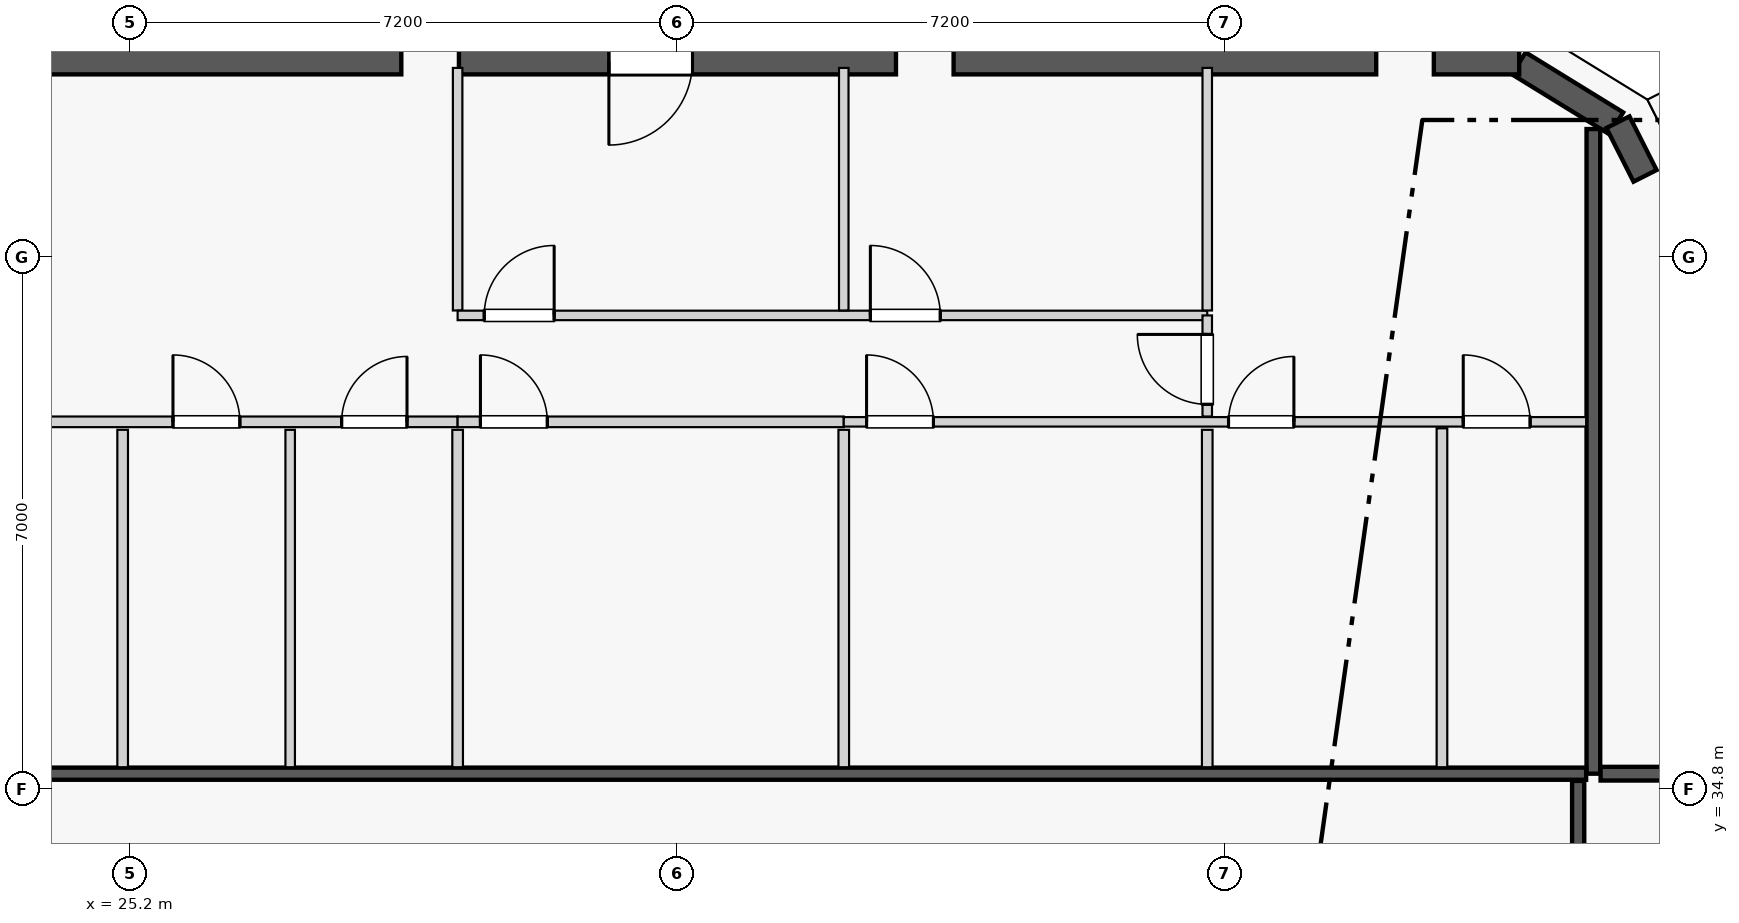
"""IFC4 building model, lengths in metres.
Left out: names, types, materials, properties, quantities, classifications, styles, units other than length and angle.
Written with IfcOpenShell. Run it as: python <this file> out.ifc"""

import sys

from ifc_helpers import new_model, si_unit, direction, frame, frame_2d, origin, origin_2d, place, context, subcontext, project, spatial, rectangle, extrude, element, fill, save


model = new_model("IFC4")
c1 = context("Model", 3, precision=1e-05, world=origin(), true_north=direction((0.0, 1.0)))
c2 = subcontext(c1, "Body", "Model", "MODEL_VIEW")
j1 = project(units=[si_unit("LENGTHUNIT", "METRE"), si_unit("PLANEANGLEUNIT", "RADIAN")], contexts=[c1])
p1 = place(None, origin())
s1 = spatial("IfcSite", under=j1, at=p1, CompositionType="ELEMENT")
p2 = place(p1, origin())
s2 = spatial("IfcBuilding", under=s1, at=p2, CompositionType="ELEMENT")
p3 = place(p2, frame((0.0, 0.0, 241.6)))
s3 = spatial("IfcBuildingStorey", under=s2, at=p3, CompositionType="ELEMENT", Elevation=241.6)
for number, where, z_axis, x_axis in (
    (1, (45.341, 42.409, 0.0), (0.0, 0.0, 1.0), (1.0, 0.0, 0.0)),
    (2, (41.972, 44.361, 0.0), (0.0, 0.0, 1.0), (1.0, 0.0, 0.0)),
    (3, (35.654, 44.308, 0.0), (0.0, 0.0, 1.0), (1.0, 0.0, 0.0)),
    (4, (29.146, 44.308, 0.0), (0.0, 0.0, 1.0), (1.0, 0.0, 0.0)),
):
    element("IfcColumn", number, at=place(p3, frame(where, z_axis=z_axis, x_axis=x_axis)), inside=s3, PredefinedType="COLUMN", context=c2, shape_type="SweptSolid", body=[
        extrude(rectangle(XDim=0.75, YDim=0.75, at=origin_2d()), origin(), (0.0, 0.0, 1.0), 3.65),
    ])
p4 = place(p3, frame((43.657, 43.385, 0.0), z_axis=(0.0, 0.0, 1.0), x_axis=(-0.865256437757, 0.501329529272, 0.0)))
e5 = element("IfcColumn", 5, at=p4, inside=s3, PredefinedType="PILASTER", context=c2, shape_type="SweptSolid", body=[
    extrude(rectangle(XDim=0.5, YDim=0.35, at=origin_2d()), origin(), (0.0, 0.0, 1.0), 3.65),
])
p5 = place(p3, frame((44.753, 43.555, 0.0), z_axis=(0.0, 0.0, 1.0), x_axis=(-0.851680557619, 0.52406128246, 0.0)))
e6 = element("IfcWall", 6, at=p5, inside=s3, PredefinedType="STANDARD", context=c2, shape_type="SweptSolid", body=[
    extrude(rectangle(XDim=1.508, YDim=0.34, at=frame_2d((0.754, 0.0))), origin(), (0.0, 0.0, 1.0), 3.45),
])
p6 = place(p3, frame((45.13, 42.865, 0.0), z_axis=(0.0, 0.0, 1.0), x_axis=(-0.451159191899, 0.892443490404, 0.0)))
e7 = element("IfcWall", 7, at=p6, inside=s3, PredefinedType="STANDARD", context=c2, shape_type="SweptSolid", body=[
    extrude(rectangle(XDim=0.791, YDim=0.34, at=frame_2d((0.396, 0.0))), origin(), (0.0, 0.0, 1.0), 3.45),
])
p7 = place(p3, frame((43.474, 44.37, 0.0), z_axis=(0.0, 0.0, 1.0), x_axis=(-1.0, 0.0, 0.0)))
e8 = element("IfcWall", 8, at=p7, inside=s3, PredefinedType="STANDARD", context=c2, shape_type="SweptSolid", body=[
    extrude(rectangle(XDim=1.123, YDim=0.34, at=frame_2d((0.562, 0.0))), origin(), (0.0, 0.0, 1.0), 3.45),
])
p8 = place(p3, frame((41.593, 44.37, 0.0), z_axis=(0.0, 0.0, 1.0), x_axis=(-1.0, 0.0, 0.0)))
e9 = element("IfcWall", 9, at=p8, inside=s3, PredefinedType="STANDARD", context=c2, shape_type="SweptSolid", body=[
    extrude(rectangle(XDim=5.56, YDim=0.34, at=frame_2d((2.78, 0.0))), origin(), (0.0, 0.0, 1.0), 2.983),
])
p9 = place(p8, frame((0.28, 0.0, 0.75)))
e10 = element("IfcOpeningElement", 10, at=p9, cuts=e9, PredefinedType="OPENING", context=c2, shape_type="SweptSolid", body=[
    extrude(rectangle(XDim=1.55, YDim=2.05, at=frame_2d((0.775, 1.025))), frame((0.0, 0.18, 0.0), z_axis=(0.0, -1.0, 0.0), x_axis=(1.0, 0.0, 0.0)), (0.0, 0.0, 1.0), 0.36),
])
p10 = place(p8, frame((3.398, 0.0, 0.75)))
e11 = element("IfcOpeningElement", 11, at=p10, cuts=e9, PredefinedType="OPENING", context=c2, shape_type="SweptSolid", body=[
    extrude(rectangle(XDim=1.1, YDim=2.0, at=frame_2d((0.55, 1.0))), frame((0.0, 0.18, 0.0), z_axis=(0.0, -1.0, 0.0), x_axis=(1.0, 0.0, 0.0)), (0.0, 0.0, 1.0), 0.36),
])
p11 = place(p3, frame((35.275, 44.37, 0.0), z_axis=(0.0, 0.0, 1.0), x_axis=(-1.0, 0.0, 0.0)))
e12 = element("IfcWall", 12, at=p11, inside=s3, PredefinedType="STANDARD", context=c2, shape_type="SweptSolid", body=[
    extrude(rectangle(XDim=5.75, YDim=0.34, at=frame_2d((2.875, 0.0))), origin(), (0.0, 0.0, 1.0), 2.983),
])
p12 = place(p11, frame((2.677, 0.0, 0.0)))
e13 = element("IfcOpeningElement", 13, at=p12, cuts=e12, PredefinedType="OPENING", context=c2, shape_type="SweptSolid", body=[
    extrude(rectangle(XDim=1.1, YDim=2.25, at=frame_2d((0.55, 1.125))), frame((0.0, 0.18, 0.0), z_axis=(0.0, -1.0, 0.0), x_axis=(1.0, 0.0, 0.0)), (0.0, 0.0, 1.0), 0.36),
])
p13 = place(p3, frame((28.767, 44.37, 0.0), z_axis=(0.0, 0.0, 1.0), x_axis=(-1.0, 0.0, 0.0)))
e14 = element("IfcWall", 14, at=p13, inside=s3, PredefinedType="STANDARD", context=c2, shape_type="SweptSolid", body=[
    extrude(rectangle(XDim=5.56, YDim=0.34, at=frame_2d((2.78, 0.0))), origin(), (0.0, 0.0, 1.0), 2.983),
])
p14 = place(p13, frame((2.155, 0.0, 0.75)))
e15 = element("IfcOpeningElement", 15, at=p14, cuts=e14, PredefinedType="OPENING", context=c2, shape_type="SweptSolid", body=[
    extrude(rectangle(XDim=1.25, YDim=1.95, at=frame_2d((0.625, 0.975))), frame((0.0, 0.18, 0.0), z_axis=(0.0, -1.0, 0.0), x_axis=(1.0, 0.0, 0.0)), (0.0, 0.0, 1.0), 0.36),
])
p15 = place(p3, frame((44.45, 35.0, 0.0), z_axis=(0.0, 0.0, 1.0), x_axis=(0.0, 1.0, 0.0)))
e16 = element("IfcWall", 16, at=p15, inside=s3, PredefinedType="PARTITIONING", context=c2, shape_type="SweptSolid", body=[
    extrude(rectangle(XDim=8.481, YDim=0.18, at=frame_2d((4.24, 0.0))), origin(), (0.0, 0.0, 1.0), 3.45),
])
p16 = place(p3, frame((20.445, 35.0, 0.0), z_axis=(0.0, 0.0, 1.0), x_axis=(1.0, 0.0, 0.0)))
e17 = element("IfcWall", 17, at=p16, inside=s3, PredefinedType="PARTITIONING", context=c2, shape_type="SweptSolid", body=[
    extrude(rectangle(XDim=23.91, YDim=0.16, at=frame_2d((11.955, 0.0))), origin(), (0.0, 0.0, 1.0), 3.45),
])
p17 = place(p16, frame((0.405, 0.0, 0.0)))
e18 = element("IfcOpeningElement", 18, at=p17, cuts=e17, PredefinedType="OPENING", context=c2, shape_type="SweptSolid", body=[
    extrude(rectangle(XDim=1.35, YDim=2.35, at=frame_2d((0.675, 1.175))), frame((0.0, 0.09, 0.0), z_axis=(0.0, -1.0, 0.0), x_axis=(1.0, 0.0, 0.0)), (0.0, 0.0, 1.0), 0.18),
])
p18 = place(p3, frame((22.4, 39.629, 0.0), z_axis=(0.0, 0.0, 1.0), x_axis=(1.0, 0.0, 0.0)))
e19 = element("IfcWall", 19, at=p18, inside=s3, PredefinedType="PLUMBINGWALL", context=c2, shape_type="SweptSolid", body=[
    extrude(rectangle(XDim=7.108, YDim=0.14, at=frame_2d((3.554, 0.0))), origin(), (0.0, 0.0, 1.0), 3.45),
])
p19 = place(p18, frame((5.582, 0.0, 0.0)))
e20 = element("IfcOpeningElement", 20, at=p19, cuts=e19, PredefinedType="OPENING", context=c2, shape_type="SweptSolid", body=[
    extrude(rectangle(XDim=0.86, YDim=2.1, at=frame_2d((0.43, 1.05))), frame((0.0, 0.08, 0.0), z_axis=(0.0, -1.0, 0.0), x_axis=(1.0, 0.0, 0.0)), (0.0, 0.0, 1.0), 0.16),
])
p20 = place(p18, frame((0.26, 0.0, 0.0)))
e21 = element("IfcOpeningElement", 21, at=p20, cuts=e19, PredefinedType="OPENING", context=c2, shape_type="SweptSolid", body=[
    extrude(rectangle(XDim=0.88, YDim=2.15, at=frame_2d((0.44, 1.075))), frame((0.0, 0.08, 0.0), z_axis=(0.0, -1.0, 0.0), x_axis=(1.0, 0.0, 0.0)), (0.0, 0.0, 1.0), 0.16),
])
p21 = place(p18, frame((3.363, 0.0, 0.0)))
e22 = element("IfcOpeningElement", 22, at=p21, cuts=e19, PredefinedType="OPENING", context=c2, shape_type="SweptSolid", body=[
    extrude(rectangle(XDim=0.88, YDim=2.15, at=frame_2d((0.44, 1.075))), frame((0.0, 0.08, 0.0), z_axis=(0.0, -1.0, 0.0), x_axis=(1.0, 0.0, 0.0)), (0.0, 0.0, 1.0), 0.16),
])
p22 = place(p3, frame((29.508, 39.629, 0.0), z_axis=(0.0, 0.0, 1.0), x_axis=(1.0, 0.0, 0.0)))
e23 = element("IfcWall", 23, at=p22, inside=s3, PredefinedType="PLUMBINGWALL", context=c2, shape_type="SweptSolid", body=[
    extrude(rectangle(XDim=5.08, YDim=0.14, at=frame_2d((2.54, 0.0))), origin(), (0.0, 0.0, 1.0), 3.45),
])
p23 = place(p22, frame((0.3, 0.0, 0.0)))
e24 = element("IfcOpeningElement", 24, at=p23, cuts=e23, PredefinedType="OPENING", context=c2, shape_type="SweptSolid", body=[
    extrude(rectangle(XDim=0.88, YDim=2.15, at=frame_2d((0.44, 1.075))), frame((0.0, 0.08, 0.0), z_axis=(0.0, -1.0, 0.0), x_axis=(1.0, 0.0, 0.0)), (0.0, 0.0, 1.0), 0.16),
])
p24 = place(p3, frame((34.588, 39.629, 0.0), z_axis=(0.0, 0.0, 1.0), x_axis=(1.0, 0.0, 0.0)))
e25 = element("IfcWall", 25, at=p24, inside=s3, PredefinedType="PARTITIONING", context=c2, shape_type="SweptSolid", body=[
    extrude(rectangle(XDim=9.767, YDim=0.125, at=frame_2d((4.884, 0.0))), origin(), (0.0, 0.0, 1.0), 3.45),
])
p25 = place(p24, frame((5.062, 0.0, 0.0)))
e26 = element("IfcOpeningElement", 26, at=p25, cuts=e25, PredefinedType="OPENING", context=c2, shape_type="SweptSolid", body=[
    extrude(rectangle(XDim=0.86, YDim=2.1, at=frame_2d((0.43, 1.05))), frame((0.0, 0.073, 0.0), z_axis=(0.0, -1.0, 0.0), x_axis=(1.0, 0.0, 0.0)), (0.0, 0.0, 1.0), 0.145),
])
p26 = place(p24, frame((8.15, 0.0, 0.0)))
e27 = element("IfcOpeningElement", 27, at=p26, cuts=e25, PredefinedType="OPENING", context=c2, shape_type="SweptSolid", body=[
    extrude(rectangle(XDim=0.88, YDim=2.15, at=frame_2d((0.44, 1.075))), frame((0.0, 0.073, 0.0), z_axis=(0.0, -1.0, 0.0), x_axis=(1.0, 0.0, 0.0)), (0.0, 0.0, 1.0), 0.145),
])
p27 = place(p24, frame((0.3, 0.0, 0.0)))
e28 = element("IfcOpeningElement", 28, at=p27, cuts=e25, PredefinedType="OPENING", context=c2, shape_type="SweptSolid", body=[
    extrude(rectangle(XDim=0.88, YDim=2.15, at=frame_2d((0.44, 1.075))), frame((0.0, 0.073, 0.0), z_axis=(0.0, -1.0, 0.0), x_axis=(1.0, 0.0, 0.0)), (0.0, 0.0, 1.0), 0.145),
])
p28 = place(p3, frame((25.101, 35.085, 0.0), z_axis=(0.0, 0.0, 1.0), x_axis=(0.0, 1.0, 0.0)))
e29 = element("IfcWall", 29, at=p28, inside=s3, PredefinedType="PLUMBINGWALL", context=c2, shape_type="SweptSolid", body=[
    extrude(rectangle(XDim=4.439, YDim=0.14, at=frame_2d((2.219, 0.0))), origin(), (0.0, 0.0, 1.0), 3.45),
])
p29 = place(p3, frame((27.305, 35.085, 0.0), z_axis=(0.0, 0.0, 1.0), x_axis=(0.0, 1.0, 0.0)))
e30 = element("IfcWall", 30, at=p29, inside=s3, PredefinedType="PARTITIONING", context=c2, shape_type="SweptSolid", body=[
    extrude(rectangle(XDim=4.439, YDim=0.125, at=frame_2d((2.219, 0.0))), origin(), (0.0, 0.0, 1.0), 3.45),
])
p30 = place(p3, frame((29.508, 41.094, 0.0), z_axis=(0.0, 0.0, 1.0), x_axis=(0.0, 1.0, 0.0)))
e31 = element("IfcWall", 31, at=p30, inside=s3, PredefinedType="PARTITIONING", context=c2, shape_type="SweptSolid", body=[
    extrude(rectangle(XDim=3.191, YDim=0.125, at=frame_2d((1.595, 0.0))), origin(), (0.0, 0.0, 1.0), 3.45),
])
p31 = place(p3, frame((29.508, 41.029, 0.0), z_axis=(0.0, 0.0, 1.0), x_axis=(1.0, 0.0, 0.0)))
e32 = element("IfcWall", 32, at=p31, inside=s3, PredefinedType="PARTITIONING", context=c2, shape_type="SweptSolid", body=[
    extrude(rectangle(XDim=9.862, YDim=0.125, at=frame_2d((4.931, 0.0))), origin(), (0.0, 0.0, 1.0), 3.45),
])
p32 = place(p31, frame((0.35, 0.0, 0.0)))
e33 = element("IfcOpeningElement", 33, at=p32, cuts=e32, PredefinedType="OPENING", context=c2, shape_type="SweptSolid", body=[
    extrude(rectangle(XDim=0.92, YDim=2.15, at=frame_2d((0.46, 1.075))), frame((0.0, 0.073, 0.0), z_axis=(0.0, -1.0, 0.0), x_axis=(1.0, 0.0, 0.0)), (0.0, 0.0, 1.0), 0.145),
])
p33 = place(p31, frame((5.43, 0.0, 0.0)))
e34 = element("IfcOpeningElement", 34, at=p33, cuts=e32, PredefinedType="OPENING", context=c2, shape_type="SweptSolid", body=[
    extrude(rectangle(XDim=0.92, YDim=2.15, at=frame_2d((0.46, 1.075))), frame((0.0, 0.073, 0.0), z_axis=(0.0, -1.0, 0.0), x_axis=(1.0, 0.0, 0.0)), (0.0, 0.0, 1.0), 0.145),
])
p34 = place(p3, frame((39.37, 39.699, 0.0), z_axis=(0.0, 0.0, 1.0), x_axis=(0.0, 1.0, 0.0)))
e35 = element("IfcWall", 35, at=p34, inside=s3, PredefinedType="PARTITIONING", context=c2, shape_type="SweptSolid", body=[
    extrude(rectangle(XDim=1.33, YDim=0.125, at=frame_2d((0.665, 0.0))), origin(), (0.0, 0.0, 1.0), 3.45),
])
p35 = place(p34, frame((0.16, 0.0, 0.0)))
e36 = element("IfcOpeningElement", 36, at=p35, cuts=e35, PredefinedType="OPENING", context=c2, shape_type="SweptSolid", body=[
    extrude(rectangle(XDim=0.92, YDim=2.15, at=frame_2d((0.46, 1.075))), frame((0.0, 0.073, 0.0), z_axis=(0.0, -1.0, 0.0), x_axis=(1.0, 0.0, 0.0)), (0.0, 0.0, 1.0), 0.145),
])
for number, where, z_axis, x_axis in (
    (37, (29.508, 35.085, 0.0), (0.0, 0.0, 1.0), (0.0, 1.0, 0.0)),
    (38, (34.588, 35.085, 0.0), (0.0, 0.0, 1.0), (0.0, 1.0, 0.0)),
):
    element("IfcWall", number, at=place(p3, frame(where, z_axis=z_axis, x_axis=x_axis)), inside=s3, PredefinedType="PLUMBINGWALL", context=c2, shape_type="SweptSolid", body=[
        extrude(rectangle(XDim=4.439, YDim=0.14, at=frame_2d((2.219, 0.0))), origin(), (0.0, 0.0, 1.0), 3.45),
    ])
for number, where, z_axis, x_axis in (
    (39, (34.588, 41.094, 0.0), (0.0, 0.0, 1.0), (0.0, 1.0, 0.0)),
    (40, (39.37, 41.094, 0.0), (0.0, 0.0, 1.0), (0.0, 1.0, 0.0)),
):
    element("IfcWall", number, at=place(p3, frame(where, z_axis=z_axis, x_axis=x_axis)), inside=s3, PredefinedType="PARTITIONING", context=c2, shape_type="SweptSolid", body=[
        extrude(rectangle(XDim=3.191, YDim=0.125, at=frame_2d((1.595, 0.0))), origin(), (0.0, 0.0, 1.0), 3.45),
    ])
p36 = place(p3, frame((39.37, 35.085, 0.0), z_axis=(0.0, 0.0, 1.0), x_axis=(0.0, 1.0, 0.0)))
e41 = element("IfcWall", 41, at=p36, inside=s3, PredefinedType="PLUMBINGWALL", context=c2, shape_type="SweptSolid", body=[
    extrude(rectangle(XDim=4.439, YDim=0.14, at=frame_2d((2.219, 0.0))), origin(), (0.0, 0.0, 1.0), 3.45),
])
p37 = place(p3, frame((42.458, 35.085, 0.0), z_axis=(0.0, 0.0, 1.0), x_axis=(0.0, 1.0, 0.0)))
e42 = element("IfcWall", 42, at=p37, inside=s3, PredefinedType="PLUMBINGWALL", context=c2, shape_type="SweptSolid", body=[
    extrude(rectangle(XDim=4.459, YDim=0.14, at=frame_2d((2.229, 0.0))), origin(), (0.0, 0.0, 1.0), 3.45),
])
p38 = place(p3, frame((44.545, 35.0, 0.0), z_axis=(0.0, 0.0, 1.0), x_axis=(1.0, 0.0, 0.0)))
e43 = element("IfcWall", 43, at=p38, inside=s3, PredefinedType="PARTITIONING", context=c2, shape_type="SweptSolid", body=[
    extrude(rectangle(XDim=4.322, YDim=0.18, at=frame_2d((2.161, 0.0))), origin(), (0.0, 0.0, 1.0), 3.45),
])
p39 = place(p3, frame((44.25, 16.495, 0.0), z_axis=(0.0, 0.0, 1.0), x_axis=(0.0, 1.0, 0.0)))
e44 = element("IfcWall", 44, at=p39, inside=s3, PredefinedType="PARTITIONING", context=c2, shape_type="SweptSolid", body=[
    extrude(rectangle(XDim=18.41, YDim=0.16, at=frame_2d((9.205, 0.0))), origin(), (0.0, 0.0, 1.0), 3.137),
])
p40 = place(p39, frame((0.45, 0.0, 0.0)))
e45 = element("IfcOpeningElement", 45, at=p40, cuts=e44, PredefinedType="OPENING", context=c2, shape_type="SweptSolid", body=[
    extrude(rectangle(XDim=1.02, YDim=2.25, at=frame_2d((0.51, 1.125))), frame((0.0, 0.09, 0.0), z_axis=(0.0, -1.0, 0.0), x_axis=(1.0, 0.0, 0.0)), (0.0, 0.0, 1.0), 0.18),
])
p41 = place(p9, origin())
e46 = element("IfcWindow", 46, at=p41, inside=s3, PartitioningType="SINGLE_PANEL", PredefinedType="WINDOW", context=c2, shape_type="SweptSolid", body=[
    extrude(rectangle(XDim=1.55, YDim=2.05, at=frame_2d((0.775, 1.025))), frame((0.0, 0.03, 0.0), z_axis=(0.0, -1.0, 0.0), x_axis=(1.0, 0.0, 0.0)), (0.0, 0.0, 1.0), 0.06),
])
fill(e10, e46)
p42 = place(p12, origin())
e47 = element("IfcDoor", 47, at=p42, inside=s3, OperationType="SINGLE_SWING_RIGHT", PredefinedType="DOOR", context=c2, shape_type="SweptSolid", body=[
    extrude(rectangle(XDim=1.1, YDim=2.25, at=frame_2d((0.55, 1.125))), frame((0.0, 0.025, 0.0), z_axis=(0.0, -1.0, 0.0), x_axis=(1.0, 0.0, 0.0)), (0.0, 0.0, 1.0), 0.05),
])
fill(e13, e47)
p43 = place(p14, origin())
e48 = element("IfcWindow", 48, at=p43, inside=s3, PartitioningType="SINGLE_PANEL", PredefinedType="WINDOW", context=c2, shape_type="SweptSolid", body=[
    extrude(rectangle(XDim=1.25, YDim=1.95, at=frame_2d((0.625, 0.975))), frame((0.0, 0.03, 0.0), z_axis=(0.0, -1.0, 0.0), x_axis=(1.0, 0.0, 0.0)), (0.0, 0.0, 1.0), 0.06),
])
fill(e15, e48)
p44 = place(p19, origin())
e49 = element("IfcDoor", 49, at=p44, inside=s3, OperationType="SINGLE_SWING_RIGHT", PredefinedType="DOOR", context=c2, shape_type="SweptSolid", body=[
    extrude(rectangle(XDim=0.86, YDim=2.1, at=frame_2d((0.43, 1.05))), frame((0.0, 0.025, 0.0), z_axis=(0.0, -1.0, 0.0), x_axis=(1.0, 0.0, 0.0)), (0.0, 0.0, 1.0), 0.05),
])
fill(e20, e49)
p45 = place(p25, origin())
e50 = element("IfcDoor", 50, at=p45, inside=s3, OperationType="SINGLE_SWING_RIGHT", PredefinedType="DOOR", context=c2, shape_type="SweptSolid", body=[
    extrude(rectangle(XDim=0.86, YDim=2.1, at=frame_2d((0.43, 1.05))), frame((0.0, 0.025, 0.0), z_axis=(0.0, -1.0, 0.0), x_axis=(1.0, 0.0, 0.0)), (0.0, 0.0, 1.0), 0.05),
])
fill(e26, e50)
p46 = place(p26, origin())
e51 = element("IfcDoor", 51, at=p46, inside=s3, OperationType="SINGLE_SWING_LEFT", PredefinedType="DOOR", context=c2, shape_type="SweptSolid", body=[
    extrude(rectangle(XDim=0.88, YDim=2.15, at=frame_2d((0.44, 1.075))), frame((0.0, 0.025, 0.0), z_axis=(0.0, -1.0, 0.0), x_axis=(1.0, 0.0, 0.0)), (0.0, 0.0, 1.0), 0.05),
])
fill(e27, e51)
p47 = place(p21, origin())
e52 = element("IfcDoor", 52, at=p47, inside=s3, OperationType="SINGLE_SWING_LEFT", PredefinedType="DOOR", context=c2, shape_type="SweptSolid", body=[
    extrude(rectangle(XDim=0.88, YDim=2.15, at=frame_2d((0.44, 1.075))), frame((0.0, 0.025, 0.0), z_axis=(0.0, -1.0, 0.0), x_axis=(1.0, 0.0, 0.0)), (0.0, 0.0, 1.0), 0.05),
])
fill(e22, e52)
p48 = place(p23, origin())
e53 = element("IfcDoor", 53, at=p48, inside=s3, OperationType="SINGLE_SWING_LEFT", PredefinedType="DOOR", context=c2, shape_type="SweptSolid", body=[
    extrude(rectangle(XDim=0.88, YDim=2.15, at=frame_2d((0.44, 1.075))), frame((0.0, 0.025, 0.0), z_axis=(0.0, -1.0, 0.0), x_axis=(1.0, 0.0, 0.0)), (0.0, 0.0, 1.0), 0.05),
])
fill(e24, e53)
p49 = place(p32, origin())
e54 = element("IfcDoor", 54, at=p49, inside=s3, OperationType="SINGLE_SWING_RIGHT", PredefinedType="DOOR", context=c2, shape_type="SweptSolid", body=[
    extrude(rectangle(XDim=0.92, YDim=2.15, at=frame_2d((0.46, 1.075))), frame((0.0, 0.025, 0.0), z_axis=(0.0, -1.0, 0.0), x_axis=(1.0, 0.0, 0.0)), (0.0, 0.0, 1.0), 0.05),
])
fill(e33, e54)
p50 = place(p33, origin())
e55 = element("IfcDoor", 55, at=p50, inside=s3, OperationType="SINGLE_SWING_LEFT", PredefinedType="DOOR", context=c2, shape_type="SweptSolid", body=[
    extrude(rectangle(XDim=0.92, YDim=2.15, at=frame_2d((0.46, 1.075))), frame((0.0, 0.025, 0.0), z_axis=(0.0, -1.0, 0.0), x_axis=(1.0, 0.0, 0.0)), (0.0, 0.0, 1.0), 0.05),
])
fill(e34, e55)
p51 = place(p35, origin())
e56 = element("IfcDoor", 56, at=p51, inside=s3, OperationType="SINGLE_SWING_RIGHT", PredefinedType="DOOR", context=c2, shape_type="SweptSolid", body=[
    extrude(rectangle(XDim=0.92, YDim=2.15, at=frame_2d((0.46, 1.075))), frame((0.0, 0.025, 0.0), z_axis=(0.0, -1.0, 0.0), x_axis=(1.0, 0.0, 0.0)), (0.0, 0.0, 1.0), 0.05),
])
fill(e36, e56)
p52 = place(p27, origin())
e57 = element("IfcDoor", 57, at=p52, inside=s3, OperationType="SINGLE_SWING_LEFT", PredefinedType="DOOR", context=c2, shape_type="SweptSolid", body=[
    extrude(rectangle(XDim=0.88, YDim=2.15, at=frame_2d((0.44, 1.075))), frame((0.0, 0.025, 0.0), z_axis=(0.0, -1.0, 0.0), x_axis=(1.0, 0.0, 0.0)), (0.0, 0.0, 1.0), 0.05),
])
fill(e28, e57)
p53 = place(p10, origin())
e58 = element("IfcWindow", 58, at=p53, inside=s3, PartitioningType="SINGLE_PANEL", PredefinedType="WINDOW", context=c2, shape_type="SweptSolid", body=[
    extrude(rectangle(XDim=1.1, YDim=2.0, at=frame_2d((0.55, 1.0))), frame((0.0, 0.03, 0.0), z_axis=(0.0, -1.0, 0.0), x_axis=(1.0, 0.0, 0.0)), (0.0, 0.0, 1.0), 0.06),
])
fill(e11, e58)
save(model, sys.argv[1])
